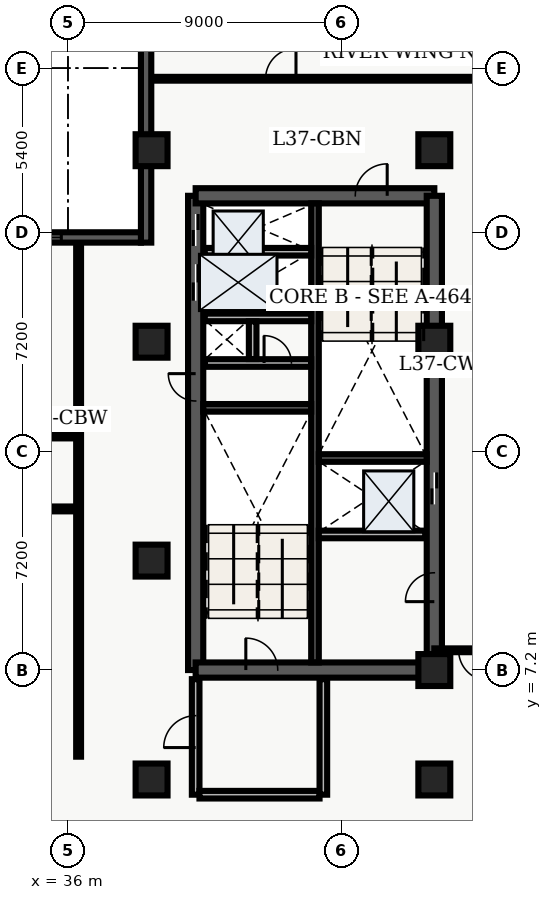
"""IFC4 building model, lengths in metres.
Left out: names, types, materials, properties, quantities, classifications, styles, units other than length and angle.
Written with IfcOpenShell. Run it as: python <this file> out.ifc"""

import sys

from ifc_helpers import new_model, entity, si_unit, converted_unit, direction, frame, origin_with_axes, origin_2d_with_axis, place, context, subcontext, project, spatial, polyline, rectangle, outline, extrude, element, fill, save


model = new_model("IFC4")
c1 = context("Model", 3, precision=1e-05, world=origin_with_axes(), true_north=direction((0.0, 1.0)))
c2 = subcontext(c1, "Body", "Model", "MODEL_VIEW")
j1 = project(units=[si_unit("LENGTHUNIT", "METRE"), converted_unit("PLANEANGLEUNIT", "DEGREE", entity("IfcPlaneAngleMeasure", 0.017), si_unit("PLANEANGLEUNIT", "RADIAN"), dimensions=[0, 0, 0, 0, 0, 0, 0])], contexts=[c1])
p1 = place(None, origin_with_axes())
s1 = spatial("IfcSite", under=j1, at=p1, CompositionType="ELEMENT")
p2 = place(p1, origin_with_axes())
s2 = spatial("IfcBuilding", under=s1, at=p2, CompositionType="ELEMENT")
p3 = place(p2, frame((0.0, 0.0, 152.4), z_axis=(0.0, 0.0, 1.0), x_axis=(1.0, 0.0, 0.0)))
s3 = spatial("IfcBuildingStorey", under=s2, at=p3, CompositionType="ELEMENT", Elevation=152.4)
p4 = place(p3, frame((40.2, 7.2, 0.0), z_axis=(0.0, 0.0, 1.0), x_axis=(0.0, 1.0, 0.0)))
e1 = element("IfcWall", 1, at=p4, inside=s3, PredefinedType="SHEAR", context=c2, shape_type="SweptSolid", body=[
    extrude(outline(polyline([(0.0, -0.25), (15.6, -0.25), (15.6, 0.25), (0.0, 0.25), (0.0, -0.25)])), origin_with_axes(), (0.0, 0.0, 1.0), 3.66),
])
p5 = place(p4, frame((14.475, 0.0, 0.0), z_axis=(0.0, 0.0, 1.0), x_axis=(1.0, 0.0, 0.0)))
e2 = element("IfcOpeningElement", 2, at=p5, cuts=e1, PredefinedType="OPENING", context=c2, shape_type="SweptSolid", body=[
    extrude(rectangle(XDim=1.05, YDim=0.52, at=origin_2d_with_axis()), origin_with_axes(), (0.0, 0.0, 1.0), 2.15),
])
p6 = place(p4, frame((12.75, 0.0, 0.0), z_axis=(0.0, 0.0, 1.0), x_axis=(1.0, 0.0, 0.0)))
e3 = element("IfcOpeningElement", 3, at=p6, cuts=e1, PredefinedType="OPENING", context=c2, shape_type="SweptSolid", body=[
    extrude(rectangle(XDim=1.2, YDim=0.52, at=origin_2d_with_axis()), origin_with_axes(), (0.0, 0.0, 1.0), 2.15),
])
p7 = place(p4, frame((9.3, 0.0, 0.0), z_axis=(0.0, 0.0, 1.0), x_axis=(1.0, 0.0, 0.0)))
e4 = element("IfcOpeningElement", 4, at=p7, cuts=e1, PredefinedType="OPENING", context=c2, shape_type="SweptSolid", body=[
    extrude(rectangle(XDim=0.9, YDim=0.52, at=origin_2d_with_axis()), origin_with_axes(), (0.0, 0.0, 1.0), 2.15),
])
p8 = place(p3, frame((40.2, 7.2, 0.0), z_axis=(0.0, 0.0, 1.0), x_axis=(1.0, 0.0, 0.0)))
e5 = element("IfcWall", 5, at=p8, inside=s3, PredefinedType="SHEAR", context=c2, shape_type="SweptSolid", body=[
    extrude(outline(polyline([(0.0, -0.25), (7.85, -0.25), (7.85, 0.25), (0.0, 0.25), (0.0, -0.25)])), origin_with_axes(), (0.0, 0.0, 1.0), 3.66),
])
p9 = place(p8, frame((2.175, 0.0, 0.0), z_axis=(0.0, 0.0, 1.0), x_axis=(1.0, 0.0, 0.0)))
e6 = element("IfcOpeningElement", 6, at=p9, cuts=e5, PredefinedType="OPENING", context=c2, shape_type="SweptSolid", body=[
    extrude(rectangle(XDim=1.05, YDim=0.52, at=origin_2d_with_axis()), origin_with_axes(), (0.0, 0.0, 1.0), 2.15),
])
p10 = place(p3, frame((40.2, 22.8, 0.0), z_axis=(0.0, 0.0, 1.0), x_axis=(1.0, 0.0, 0.0)))
e7 = element("IfcWall", 7, at=p10, inside=s3, PredefinedType="SHEAR", context=c2, shape_type="SweptSolid", body=[
    extrude(outline(polyline([(0.0, -0.25), (7.85, -0.25), (7.85, 0.25), (0.0, 0.25), (0.0, -0.25)])), origin_with_axes(), (0.0, 0.0, 1.0), 3.66),
])
p11 = place(p10, frame((5.775, 0.0, 0.0), z_axis=(0.0, 0.0, 1.0), x_axis=(1.0, 0.0, 0.0)))
e8 = element("IfcOpeningElement", 8, at=p11, cuts=e7, PredefinedType="OPENING", context=c2, shape_type="SweptSolid", body=[
    extrude(rectangle(XDim=1.05, YDim=0.52, at=origin_2d_with_axis()), origin_with_axes(), (0.0, 0.0, 1.0), 2.15),
])
p12 = place(p3, frame((48.05, 7.2, 0.0), z_axis=(0.0, 0.0, 1.0), x_axis=(0.0, 1.0, 0.0)))
e9 = element("IfcWall", 9, at=p12, inside=s3, PredefinedType="SHEAR", context=c2, shape_type="SweptSolid", body=[
    extrude(outline(polyline([(0.0, -0.25), (15.6, -0.25), (15.6, 0.25), (0.0, 0.25), (0.0, -0.25)])), origin_with_axes(), (0.0, 0.0, 1.0), 3.66),
])
p13 = place(p12, frame((5.975, 0.0, 0.0), z_axis=(0.0, 0.0, 1.0), x_axis=(1.0, 0.0, 0.0)))
e10 = element("IfcOpeningElement", 10, at=p13, cuts=e9, PredefinedType="OPENING", context=c2, shape_type="SweptSolid", body=[
    extrude(rectangle(XDim=1.05, YDim=0.52, at=origin_2d_with_axis()), origin_with_axes(), (0.0, 0.0, 1.0), 2.15),
])
p14 = place(p12, frame((2.725, 0.0, 0.0), z_axis=(0.0, 0.0, 1.0), x_axis=(1.0, 0.0, 0.0)))
e11 = element("IfcOpeningElement", 11, at=p14, cuts=e9, PredefinedType="OPENING", context=c2, shape_type="SweptSolid", body=[
    extrude(rectangle(XDim=0.95, YDim=0.52, at=origin_2d_with_axis()), origin_with_axes(), (0.0, 0.0, 1.0), 2.15),
])
p15 = place(p3, frame((44.125, 7.45, 0.0), z_axis=(0.0, 0.0, 1.0), x_axis=(0.0, 1.0, 0.0)))
e12 = element("IfcWall", 12, at=p15, inside=s3, PredefinedType="SHEAR", context=c2, shape_type="SweptSolid", body=[
    extrude(outline(polyline([(0.0, -0.125), (15.1, -0.125), (15.1, 0.125), (0.0, 0.125), (0.0, -0.125)])), origin_with_axes(), (0.0, 0.0, 1.0), 3.66),
])
for number, where, z_axis, x_axis in (
    (13, (40.45, 15.825, 0.0), (0.0, 0.0, 1.0), (1.0, 0.0, 0.0)),
    (14, (44.25, 14.175, 0.0), (0.0, 0.0, 1.0), (1.0, 0.0, 0.0)),
):
    element("IfcWall", number, at=place(p3, frame(where, z_axis=z_axis, x_axis=x_axis)), inside=s3, PredefinedType="SHEAR", context=c2, shape_type="SweptSolid", body=[
        extrude(outline(polyline([(0.0, -0.125), (3.55, -0.125), (3.55, 0.125), (0.0, 0.125), (0.0, -0.125)])), origin_with_axes(), (0.0, 0.0, 1.0), 3.66),
    ])
p16 = place(p3, frame((40.5, 17.3, 0.0), z_axis=(0.0, 0.0, 1.0), x_axis=(1.0, 0.0, 0.0)))
e15 = element("IfcWall", 15, at=p16, inside=s3, PredefinedType="SOLIDWALL", context=c2, shape_type="SweptSolid", body=[
    extrude(outline(polyline([(0.0, -0.125), (3.5, -0.125), (3.5, 0.125), (0.0, 0.125), (0.0, -0.125)])), origin_with_axes(), (0.0, 0.0, 1.0), 2.7),
])
p17 = place(p16, frame((2.4, 0.0, 0.0), z_axis=(0.0, 0.0, 1.0), x_axis=(1.0, 0.0, 0.0)))
e16 = element("IfcOpeningElement", 16, at=p17, cuts=e15, PredefinedType="OPENING", context=c2, shape_type="SweptSolid", body=[
    extrude(rectangle(XDim=0.9, YDim=0.27, at=origin_2d_with_axis()), origin_with_axes(), (0.0, 0.0, 1.0), 2.15),
])
p18 = place(p3, frame((40.5, 18.8, 0.0), z_axis=(0.0, 0.0, 1.0), x_axis=(1.0, 0.0, 0.0)))
e17 = element("IfcWall", 17, at=p18, inside=s3, PredefinedType="SOLIDWALL", context=c2, shape_type="SweptSolid", body=[
    extrude(outline(polyline([(0.0, -0.125), (3.5, -0.125), (3.5, 0.125), (0.0, 0.125), (0.0, -0.125)])), origin_with_axes(), (0.0, 0.0, 1.0), 2.7),
])
p19 = place(p3, frame((42.075, 17.43, 0.0), z_axis=(0.0, 0.0, 1.0), x_axis=(0.0, 1.0, 0.0)))
e18 = element("IfcWall", 18, at=p19, inside=s3, PredefinedType="SOLIDWALL", context=c2, shape_type="SweptSolid", body=[
    extrude(outline(polyline([(0.0, -0.125), (1.24, -0.125), (1.24, 0.125), (0.0, 0.125), (0.0, -0.125)])), origin_with_axes(), (0.0, 0.0, 1.0), 2.7),
])
p20 = place(p3, frame((40.2, 3.1, 0.0), z_axis=(0.0, 0.0, 1.0), x_axis=(0.0, 1.0, 0.0)))
e19 = element("IfcWall", 19, at=p20, inside=s3, PredefinedType="SOLIDWALL", context=c2, shape_type="SweptSolid", body=[
    extrude(outline(polyline([(0.0, -0.125), (3.8, -0.125), (3.8, 0.125), (0.0, 0.125), (0.0, -0.125)])), origin_with_axes(), (0.0, 0.0, 1.0), 2.7),
])
p21 = place(p20, frame((2.075, 0.0, 0.0), z_axis=(0.0, 0.0, 1.0), x_axis=(1.0, 0.0, 0.0)))
e20 = element("IfcOpeningElement", 20, at=p21, cuts=e19, PredefinedType="OPENING", context=c2, shape_type="SweptSolid", body=[
    extrude(rectangle(XDim=1.05, YDim=0.27, at=origin_2d_with_axis()), origin_with_axes(), (0.0, 0.0, 1.0), 2.15),
])
p22 = place(p3, frame((40.325, 3.1, 0.0), z_axis=(0.0, 0.0, 1.0), x_axis=(1.0, 0.0, 0.0)))
e21 = element("IfcWall", 21, at=p22, inside=s3, PredefinedType="SOLIDWALL", context=c2, shape_type="SweptSolid", body=[
    extrude(outline(polyline([(0.0, -0.125), (3.95, -0.125), (3.95, 0.125), (0.0, 0.125), (0.0, -0.125)])), origin_with_axes(), (0.0, 0.0, 1.0), 2.7),
])
p23 = place(p3, frame((44.4, 3.1, 0.0), z_axis=(0.0, 0.0, 1.0), x_axis=(0.0, 1.0, 0.0)))
e22 = element("IfcWall", 22, at=p23, inside=s3, PredefinedType="SOLIDWALL", context=c2, shape_type="SweptSolid", body=[
    extrude(outline(polyline([(0.0, -0.125), (3.8, -0.125), (3.8, 0.125), (0.0, 0.125), (0.0, -0.125)])), origin_with_axes(), (0.0, 0.0, 1.0), 2.7),
])
for number, where, z_axis, x_axis in (
    (23, (38.75, 3.6, 0.0), (0.0, 0.0, 1.0), (1.0, 0.0, 0.0)),
    (24, (38.75, 10.8, 0.0), (0.0, 0.0, 1.0), (1.0, 0.0, 0.0)),
    (25, (38.75, 18.0, 0.0), (0.0, 0.0, 1.0), (1.0, 0.0, 0.0)),
    (26, (38.75, 24.3, 0.0), (0.0, 0.0, 1.0), (1.0, 0.0, 0.0)),
    (27, (48.05, 3.6, 0.0), (0.0, 0.0, 1.0), (1.0, 0.0, 0.0)),
    (28, (48.05, 7.2, 0.0), (0.0, 0.0, 1.0), (1.0, 0.0, 0.0)),
    (29, (48.05, 18.0, 0.0), (0.0, 0.0, 1.0), (1.0, 0.0, 0.0)),
    (30, (48.05, 24.3, 0.0), (0.0, 0.0, 1.0), (1.0, 0.0, 0.0)),
):
    element("IfcColumn", number, at=place(p3, frame(where, z_axis=z_axis, x_axis=x_axis)), inside=s3, PredefinedType="COLUMN", context=c2, shape_type="SweptSolid", body=[
        extrude(rectangle(XDim=1.05, YDim=1.05, at=origin_2d_with_axis()), origin_with_axes(), (0.0, 0.0, 1.0), 3.9),
    ])
for number, where, z_axis, x_axis in (
    (31, (40.5, 20.96, 0.0), (0.0, 0.0, 1.0), (1.0, 0.0, 0.0)),
    (32, (44.25, 11.66, 0.0), (0.0, 0.0, 1.0), (1.0, 0.0, 0.0)),
):
    element("IfcWall", number, at=place(p3, frame(where, z_axis=z_axis, x_axis=x_axis)), inside=s3, PredefinedType="SOLIDWALL", context=c2, shape_type="SweptSolid", body=[
        extrude(outline(polyline([(0.0, -0.125), (3.5, -0.125), (3.5, 0.125), (0.0, 0.125), (0.0, -0.125)])), origin_with_axes(), (0.0, 0.0, 1.0), 2.7),
    ])
p24 = place(p3, frame((21.15, 12.5, 0.0), z_axis=(0.0, 0.0, 1.0), x_axis=(1.0, 0.0, 0.0)))
e33 = element("IfcWall", 33, at=p24, inside=s3, PredefinedType="PARTITIONING", context=c2, shape_type="SweptSolid", body=[
    extrude(outline(polyline([(0.0, -0.08), (15.2, -0.08), (15.2, 0.08), (0.0, 0.08), (0.0, -0.08)])), origin_with_axes(), (0.0, 0.0, 1.0), 2.7),
])
p25 = place(p24, frame((2.313, 0.0, 0.0), z_axis=(0.0, 0.0, 1.0), x_axis=(1.0, 0.0, 0.0)))
e34 = element("IfcOpeningElement", 34, at=p25, cuts=e33, PredefinedType="OPENING", context=c2, shape_type="SweptSolid", body=[
    extrude(rectangle(XDim=1.0, YDim=0.18, at=origin_2d_with_axis()), origin_with_axes(), (0.0, 0.0, 1.0), 2.15),
])
p26 = place(p24, frame((6.912, 0.0, 0.0), z_axis=(0.0, 0.0, 1.0), x_axis=(1.0, 0.0, 0.0)))
e35 = element("IfcOpeningElement", 35, at=p26, cuts=e33, PredefinedType="OPENING", context=c2, shape_type="SweptSolid", body=[
    extrude(rectangle(XDim=1.0, YDim=0.18, at=origin_2d_with_axis()), origin_with_axes(), (0.0, 0.0, 1.0), 2.15),
])
p27 = place(p24, frame((12.248, 0.0, 0.0), z_axis=(0.0, 0.0, 1.0), x_axis=(1.0, 0.0, 0.0)))
e36 = element("IfcOpeningElement", 36, at=p27, cuts=e33, PredefinedType="OPENING", context=c2, shape_type="SweptSolid", body=[
    extrude(rectangle(XDim=1.2, YDim=0.18, at=origin_2d_with_axis()), origin_with_axes(), (0.0, 0.0, 1.0), 2.2),
])
p28 = place(p3, frame((21.15, 14.9, 0.0), z_axis=(0.0, 0.0, 1.0), x_axis=(1.0, 0.0, 0.0)))
e37 = element("IfcWall", 37, at=p28, inside=s3, PredefinedType="PARTITIONING", context=c2, shape_type="SweptSolid", body=[
    extrude(outline(polyline([(0.0, -0.08), (15.2, -0.08), (15.2, 0.08), (0.0, 0.08), (0.0, -0.08)])), origin_with_axes(), (0.0, 0.0, 1.0), 2.7),
])
p29 = place(p28, frame((3.47, 0.0, 0.0), z_axis=(0.0, 0.0, 1.0), x_axis=(1.0, 0.0, 0.0)))
e38 = element("IfcOpeningElement", 38, at=p29, cuts=e37, PredefinedType="OPENING", context=c2, shape_type="SweptSolid", body=[
    extrude(rectangle(XDim=1.0, YDim=0.18, at=origin_2d_with_axis()), origin_with_axes(), (0.0, 0.0, 1.0), 2.15),
])
p30 = place(p28, frame((10.94, 0.0, 0.0), z_axis=(0.0, 0.0, 1.0), x_axis=(1.0, 0.0, 0.0)))
e39 = element("IfcOpeningElement", 39, at=p30, cuts=e37, PredefinedType="OPENING", context=c2, shape_type="SweptSolid", body=[
    extrude(rectangle(XDim=1.0, YDim=0.18, at=origin_2d_with_axis()), origin_with_axes(), (0.0, 0.0, 1.0), 2.15),
])
p31 = place(p3, frame((36.35, 4.35, 0.0), z_axis=(0.0, 0.0, 1.0), x_axis=(0.0, 1.0, 0.0)))
e40 = element("IfcWall", 40, at=p31, inside=s3, PredefinedType="PARTITIONING", context=c2, shape_type="SweptSolid", body=[
    extrude(outline(polyline([(0.0, -0.08), (16.95, -0.08), (16.95, 0.08), (0.0, 0.08), (0.0, -0.08)])), origin_with_axes(), (0.0, 0.0, 1.0), 2.7),
])
p32 = place(p3, frame((59.665, 7.85, 0.0), z_axis=(0.0, 0.0, 1.0), x_axis=(-1.0, 0.0, 0.0)))
e41 = element("IfcWall", 41, at=p32, inside=s3, PredefinedType="PARTITIONING", context=c2, shape_type="SweptSolid", body=[
    extrude(outline(polyline([(0.0, -0.062), (11.615, -0.062), (11.615, 0.062), (0.0, 0.062), (0.0, -0.062)])), origin_with_axes(), (0.0, 0.0, 1.0), 2.7),
])
p33 = place(p32, frame((10.315, 0.0, 0.0), z_axis=(0.0, 0.0, 1.0), x_axis=(1.0, 0.0, 0.0)))
e42 = element("IfcOpeningElement", 42, at=p33, cuts=e41, PredefinedType="OPENING", context=c2, shape_type="SweptSolid", body=[
    extrude(rectangle(XDim=1.0, YDim=0.145, at=origin_2d_with_axis()), origin_with_axes(), (0.0, 0.0, 1.0), 2.15),
])
p34 = place(p3, frame((38.735, 26.65, 0.0), z_axis=(0.0, 0.0, 1.0), x_axis=(1.0, 0.0, 0.0)))
e43 = element("IfcWall", 43, at=p34, inside=s3, PredefinedType="PARTITIONING", context=c2, shape_type="SweptSolid", body=[
    extrude(outline(polyline([(0.0, -0.062), (20.905, -0.062), (20.905, 0.062), (0.0, 0.062), (0.0, -0.062)])), origin_with_axes(), (0.0, 0.0, 1.0), 2.7),
])
p35 = place(p34, frame((4.265, 0.0, 0.0), z_axis=(0.0, 0.0, 1.0), x_axis=(1.0, 0.0, 0.0)))
e44 = element("IfcOpeningElement", 44, at=p35, cuts=e43, PredefinedType="OPENING", context=c2, shape_type="SweptSolid", body=[
    extrude(rectangle(XDim=1.0, YDim=0.145, at=origin_2d_with_axis()), origin_with_axes(), (0.0, 0.0, 1.0), 2.15),
])
p36 = place(p3, frame((38.57, 21.26, 0.0), z_axis=(0.0, 0.0, 1.0), x_axis=(0.0, 1.0, 0.0)))
e45 = element("IfcWall", 45, at=p36, inside=s3, PredefinedType="SOLIDWALL", context=c2, shape_type="SweptSolid", body=[
    extrude(outline(polyline([(0.0, -0.17), (7.54, -0.17), (7.54, 0.17), (0.0, 0.17), (0.0, -0.17)])), origin_with_axes(), (0.0, 0.0, 1.0), 3.66),
])
p37 = place(p3, frame((22.387, 21.43, 0.0), z_axis=(0.0, 0.0, 1.0), x_axis=(1.0, 0.0, 0.0)))
e46 = element("IfcWall", 46, at=p37, inside=s3, PredefinedType="SOLIDWALL", context=c2, shape_type="SweptSolid", body=[
    extrude(outline(polyline([(0.0, -0.17), (16.013, -0.17), (16.013, 0.17), (0.0, 0.17), (0.0, -0.17)])), origin_with_axes(), (0.0, 0.0, 1.0), 3.66),
])
p38 = place(p37, frame((3.069, 0.0, 0.45), z_axis=(0.0, 0.0, 1.0), x_axis=(1.0, 0.0, 0.0)))
e47 = element("IfcOpeningElement", 47, at=p38, cuts=e46, PredefinedType="OPENING", context=c2, shape_type="SweptSolid", body=[
    extrude(rectangle(XDim=1.8, YDim=0.36, at=origin_2d_with_axis()), origin_with_axes(), (0.0, 0.0, 1.0), 2.1),
])
p39 = place(p37, frame((8.006, 0.0, 0.45), z_axis=(0.0, 0.0, 1.0), x_axis=(1.0, 0.0, 0.0)))
e48 = element("IfcOpeningElement", 48, at=p39, cuts=e46, PredefinedType="OPENING", context=c2, shape_type="SweptSolid", body=[
    extrude(rectangle(XDim=1.8, YDim=0.36, at=origin_2d_with_axis()), origin_with_axes(), (0.0, 0.0, 1.0), 2.1),
])
p40 = place(p37, frame((12.494, 0.0, 0.45), z_axis=(0.0, 0.0, 1.0), x_axis=(1.0, 0.0, 0.0)))
e49 = element("IfcOpeningElement", 49, at=p40, cuts=e46, PredefinedType="OPENING", context=c2, shape_type="SweptSolid", body=[
    extrude(rectangle(XDim=1.8, YDim=0.36, at=origin_2d_with_axis()), origin_with_axes(), (0.0, 0.0, 1.0), 2.1),
])
p41 = place(p12, frame((5.975, 0.0, 0.0), z_axis=(0.0, 0.0, 1.0), x_axis=(1.0, 0.0, 0.0)))
e50 = element("IfcDoor", 50, at=p41, inside=s3, OperationType="SLIDING_TO_LEFT", PredefinedType="DOOR", context=c2, shape_type="SweptSolid", body=[
    extrude(rectangle(XDim=1.05, YDim=0.09, at=origin_2d_with_axis()), origin_with_axes(), (0.0, 0.0, 1.0), 2.15),
])
fill(e10, e50)
p42 = place(p4, frame((14.475, 0.0, 0.0), z_axis=(0.0, 0.0, 1.0), x_axis=(1.0, 0.0, 0.0)))
e51 = element("IfcDoor", 51, at=p42, inside=s3, OperationType="SLIDING_TO_RIGHT", PredefinedType="DOOR", context=c2, shape_type="SweptSolid", body=[
    extrude(rectangle(XDim=1.05, YDim=0.09, at=origin_2d_with_axis()), origin_with_axes(), (0.0, 0.0, 1.0), 2.15),
])
fill(e2, e51)
p43 = place(p4, frame((12.75, 0.0, 0.0), z_axis=(0.0, 0.0, 1.0), x_axis=(1.0, 0.0, 0.0)))
e52 = element("IfcDoor", 52, at=p43, inside=s3, OperationType="DOUBLE_DOOR_SLIDING", PredefinedType="DOOR", context=c2, shape_type="SweptSolid", body=[
    extrude(rectangle(XDim=1.2, YDim=0.09, at=origin_2d_with_axis()), origin_with_axes(), (0.0, 0.0, 1.0), 2.15),
])
fill(e3, e52)
p44 = place(p4, frame((9.3, 0.0, 0.0), z_axis=(0.0, 0.0, 1.0), x_axis=(1.0, 0.0, 0.0)))
e53 = element("IfcDoor", 53, at=p44, inside=s3, OperationType="SINGLE_SWING_RIGHT", PredefinedType="DOOR", context=c2, shape_type="SweptSolid", body=[
    extrude(rectangle(XDim=0.9, YDim=0.09, at=origin_2d_with_axis()), origin_with_axes(), (0.0, 0.0, 1.0), 2.15),
])
fill(e4, e53)
p45 = place(p16, frame((2.4, 0.0, 0.0), z_axis=(0.0, 0.0, 1.0), x_axis=(1.0, 0.0, 0.0)))
e54 = element("IfcDoor", 54, at=p45, inside=s3, OperationType="SINGLE_SWING_LEFT", PredefinedType="DOOR", context=c2, shape_type="SweptSolid", body=[
    extrude(rectangle(XDim=0.9, YDim=0.09, at=origin_2d_with_axis()), origin_with_axes(), (0.0, 0.0, 1.0), 2.15),
])
fill(e16, e54)
p46 = place(p8, frame((2.175, 0.0, 0.0), z_axis=(0.0, 0.0, 1.0), x_axis=(1.0, 0.0, 0.0)))
e55 = element("IfcDoor", 55, at=p46, inside=s3, OperationType="SINGLE_SWING_LEFT", PredefinedType="DOOR", context=c2, shape_type="SweptSolid", body=[
    extrude(rectangle(XDim=1.05, YDim=0.09, at=origin_2d_with_axis()), origin_with_axes(), (0.0, 0.0, 1.0), 2.15),
])
fill(e6, e55)
p47 = place(p10, frame((5.775, 0.0, 0.0), z_axis=(0.0, 0.0, 1.0), x_axis=(1.0, 0.0, 0.0)))
e56 = element("IfcDoor", 56, at=p47, inside=s3, OperationType="SINGLE_SWING_RIGHT", PredefinedType="DOOR", context=c2, shape_type="SweptSolid", body=[
    extrude(rectangle(XDim=1.05, YDim=0.09, at=origin_2d_with_axis()), origin_with_axes(), (0.0, 0.0, 1.0), 2.15),
])
fill(e8, e56)
p48 = place(p20, frame((2.075, 0.0, 0.0), z_axis=(0.0, 0.0, 1.0), x_axis=(1.0, 0.0, 0.0)))
e57 = element("IfcDoor", 57, at=p48, inside=s3, OperationType="SINGLE_SWING_LEFT", PredefinedType="DOOR", context=c2, shape_type="SweptSolid", body=[
    extrude(rectangle(XDim=1.05, YDim=0.09, at=origin_2d_with_axis()), origin_with_axes(), (0.0, 0.0, 1.0), 2.15),
])
fill(e20, e57)
p49 = place(p12, frame((2.725, 0.0, 0.0), z_axis=(0.0, 0.0, 1.0), x_axis=(1.0, 0.0, 0.0)))
e58 = element("IfcDoor", 58, at=p49, inside=s3, OperationType="SINGLE_SWING_LEFT", PredefinedType="DOOR", context=c2, shape_type="SweptSolid", body=[
    extrude(rectangle(XDim=0.95, YDim=0.09, at=origin_2d_with_axis()), origin_with_axes(), (0.0, 0.0, 1.0), 2.15),
])
fill(e11, e58)
p50 = place(p32, frame((10.315, 0.0, 0.0), z_axis=(0.0, 0.0, 1.0), x_axis=(1.0, 0.0, 0.0)))
e59 = element("IfcDoor", 59, at=p50, inside=s3, OperationType="SINGLE_SWING_LEFT", PredefinedType="DOOR", context=c2, shape_type="SweptSolid", body=[
    extrude(rectangle(XDim=1.0, YDim=0.075, at=origin_2d_with_axis()), origin_with_axes(), (0.0, 0.0, 1.0), 2.15),
])
fill(e42, e59)
p51 = place(p34, frame((4.265, 0.0, 0.0), z_axis=(0.0, 0.0, 1.0), x_axis=(1.0, 0.0, 0.0)))
e60 = element("IfcDoor", 60, at=p51, inside=s3, OperationType="SINGLE_SWING_RIGHT", PredefinedType="DOOR", context=c2, shape_type="SweptSolid", body=[
    extrude(rectangle(XDim=1.0, YDim=0.075, at=origin_2d_with_axis()), origin_with_axes(), (0.0, 0.0, 1.0), 2.15),
])
fill(e44, e60)
p52 = place(p37, frame((12.494, 0.0, 0.45), z_axis=(0.0, 0.0, 1.0), x_axis=(1.0, 0.0, 0.0)))
e61 = element("IfcWindow", 61, at=p52, inside=s3, PredefinedType="WINDOW", context=c2, shape_type="SweptSolid", body=[
    extrude(rectangle(XDim=1.8, YDim=0.09, at=origin_2d_with_axis()), origin_with_axes(), (0.0, 0.0, 1.0), 2.1),
])
fill(e49, e61)
save(model, sys.argv[1])
